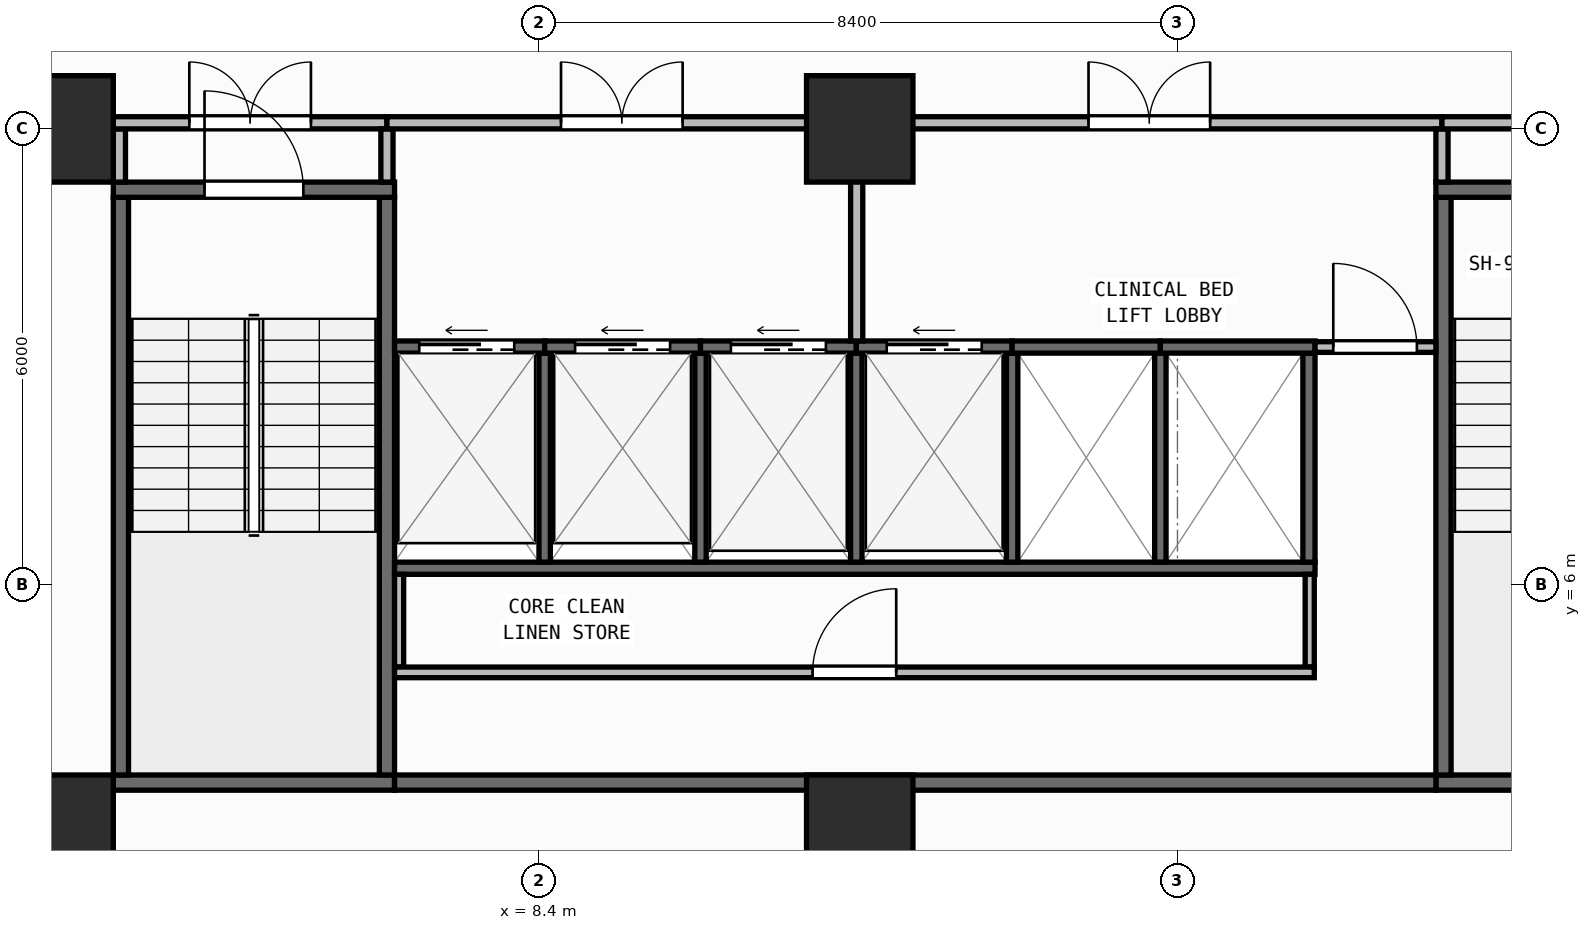
"""IFC4 building model, lengths in metres.
Left out: names, types, materials, properties, quantities, classifications, styles, units other than length and angle.
Written with IfcOpenShell. Run it as: python <this file> out.ifc"""

import sys

from ifc_helpers import new_model, si_unit, direction, frame, frame_2d, origin, origin_2d, place, context, subcontext, project, spatial, rectangle, extrude, element, fill, save


model = new_model("IFC4")
c1 = context("Model", 3, precision=1e-05, world=origin(), true_north=direction((0.0, 1.0)))
c2 = subcontext(c1, "Body", "Model", "MODEL_VIEW")
j1 = project(units=[si_unit("LENGTHUNIT", "METRE"), si_unit("PLANEANGLEUNIT", "RADIAN")], contexts=[c1])
p1 = place(None, origin())
s1 = spatial("IfcSite", under=j1, at=p1, CompositionType="ELEMENT")
p2 = place(p1, origin())
s2 = spatial("IfcBuilding", under=s1, at=p2, CompositionType="ELEMENT")
p3 = place(p2, frame((0.0, 0.0, 89.65)))
s3 = spatial("IfcBuildingStorey", under=s2, at=p3, CompositionType="ELEMENT", Elevation=89.65)
for number, where, z_axis, x_axis in (
    (1, (2.1, 2.8, 0.0), (0.0, 0.0, 1.0), (1.0, 0.0, 0.0)),
    (2, (12.62, 2.8, 0.0), (0.0, 0.0, 1.0), (1.0, 0.0, 0.0)),
    (3, (2.1, 12.0, 0.0), (0.0, 0.0, 1.0), (1.0, 0.0, 0.0)),
    (4, (12.62, 12.0, 0.0), (0.0, 0.0, 1.0), (1.0, 0.0, 0.0)),
):
    element("IfcColumn", number, at=place(p3, frame(where, z_axis=z_axis, x_axis=x_axis)), inside=s3, PredefinedType="COLUMN", context=c2, shape_type="SweptSolid", body=[
        extrude(rectangle(XDim=1.4, YDim=1.4, at=origin_2d()), origin(), (0.0, 0.0, 1.0), 3.95),
    ])
p4 = place(p3, frame((2.76, 0.174, 0.0), z_axis=(0.0, 0.0, 1.0), x_axis=(0.996571478456, 0.082736257641, 0.0)))
e5 = element("IfcWall", 5, at=p4, inside=s3, PredefinedType="STANDARD", context=c2, shape_type="SweptSolid", body=[
    extrude(rectangle(XDim=52.861, YDim=0.26, at=frame_2d((26.431, 0.0))), origin(), (0.0, 0.0, 1.0), 3.71),
])
p5 = place(p4, frame((25.231, 0.0, 0.9)))
e6 = element("IfcOpeningElement", 6, at=p5, cuts=e5, PredefinedType="OPENING", context=c2, shape_type="SweptSolid", body=[
    extrude(rectangle(XDim=2.4, YDim=1.65, at=frame_2d((1.2, 0.825))), frame((0.0, 0.14, 0.0), z_axis=(0.0, -1.0, 0.0), x_axis=(1.0, 0.0, 0.0)), (0.0, 0.0, 1.0), 0.28),
])
p6 = place(p3, frame((2.8, 3.4, 0.0), z_axis=(0.0, 0.0, 1.0), x_axis=(1.0, 0.0, 0.0)))
e7 = element("IfcWall", 7, at=p6, inside=s3, PredefinedType="SHEAR", context=c2, shape_type="SweptSolid", body=[
    extrude(rectangle(XDim=3.7, YDim=0.2, at=frame_2d((1.85, 0.0))), origin(), (0.0, 0.0, 1.0), 3.71),
])
for number, where, z_axis, x_axis in (
    (8, (2.9, 3.5, 0.0), (0.0, 0.0, 1.0), (0.0, 1.0, 0.0)),
    (9, (6.4, 3.5, 0.0), (0.0, 0.0, 1.0), (0.0, 1.0, 0.0)),
):
    element("IfcWall", number, at=place(p3, frame(where, z_axis=z_axis, x_axis=x_axis)), inside=s3, PredefinedType="SHEAR", context=c2, shape_type="SweptSolid", body=[
        extrude(rectangle(XDim=7.6, YDim=0.2, at=frame_2d((3.8, 0.0))), origin(), (0.0, 0.0, 1.0), 3.71),
    ])
p7 = place(p3, frame((2.8, 11.2, 0.0), z_axis=(0.0, 0.0, 1.0), x_axis=(1.0, 0.0, 0.0)))
e10 = element("IfcWall", 10, at=p7, inside=s3, PredefinedType="SHEAR", context=c2, shape_type="SweptSolid", body=[
    extrude(rectangle(XDim=3.7, YDim=0.2, at=frame_2d((1.85, 0.0))), origin(), (0.0, 0.0, 1.0), 3.71),
])
p8 = place(p7, frame((1.2, 0.0, 0.0)))
e11 = element("IfcOpeningElement", 11, at=p8, cuts=e10, PredefinedType="OPENING", context=c2, shape_type="SweptSolid", body=[
    extrude(rectangle(XDim=1.3, YDim=2.15, at=frame_2d((0.65, 1.075))), frame((0.0, 0.11, 0.0), z_axis=(0.0, -1.0, 0.0), x_axis=(1.0, 0.0, 0.0)), (0.0, 0.0, 1.0), 0.22),
])
p9 = place(p3, frame((20.2, 3.4, 0.0), z_axis=(0.0, 0.0, 1.0), x_axis=(1.0, 0.0, 0.0)))
e12 = element("IfcWall", 12, at=p9, inside=s3, PredefinedType="SHEAR", context=c2, shape_type="SweptSolid", body=[
    extrude(rectangle(XDim=3.7, YDim=0.2, at=frame_2d((1.85, 0.0))), origin(), (0.0, 0.0, 1.0), 3.71),
])
p10 = place(p3, frame((20.3, 3.5, 0.0), z_axis=(0.0, 0.0, 1.0), x_axis=(0.0, 1.0, 0.0)))
e13 = element("IfcWall", 13, at=p10, inside=s3, PredefinedType="SHEAR", context=c2, shape_type="SweptSolid", body=[
    extrude(rectangle(XDim=7.6, YDim=0.2, at=frame_2d((3.8, 0.0))), origin(), (0.0, 0.0, 1.0), 3.71),
])
p11 = place(p3, frame((20.2, 11.2, 0.0), z_axis=(0.0, 0.0, 1.0), x_axis=(1.0, 0.0, 0.0)))
e14 = element("IfcWall", 14, at=p11, inside=s3, PredefinedType="SHEAR", context=c2, shape_type="SweptSolid", body=[
    extrude(rectangle(XDim=3.7, YDim=0.2, at=frame_2d((1.85, 0.0))), origin(), (0.0, 0.0, 1.0), 3.71),
])
p12 = place(p11, frame((1.2, 0.0, 0.0)))
e15 = element("IfcOpeningElement", 15, at=p12, cuts=e14, PredefinedType="OPENING", context=c2, shape_type="SweptSolid", body=[
    extrude(rectangle(XDim=1.3, YDim=2.15, at=frame_2d((0.65, 1.075))), frame((0.0, 0.11, 0.0), z_axis=(0.0, -1.0, 0.0), x_axis=(1.0, 0.0, 0.0)), (0.0, 0.0, 1.0), 0.22),
])
p13 = place(p3, frame((6.5, 3.4, 0.0), z_axis=(0.0, 0.0, 1.0), x_axis=(1.0, 0.0, 0.0)))
e16 = element("IfcWall", 16, at=p13, inside=s3, PredefinedType="SHEAR", context=c2, shape_type="SweptSolid", body=[
    extrude(rectangle(XDim=13.7, YDim=0.2, at=frame_2d((6.85, 0.0))), origin(), (0.0, 0.0, 1.0), 3.71),
])
p14 = place(p3, frame((6.5, 6.22, 0.0), z_axis=(0.0, 0.0, 1.0), x_axis=(1.0, 0.0, 0.0)))
e17 = element("IfcWall", 17, at=p14, inside=s3, PredefinedType="SHEAR", context=c2, shape_type="SweptSolid", body=[
    extrude(rectangle(XDim=12.11, YDim=0.16, at=frame_2d((6.055, 0.0))), origin(), (0.0, 0.0, 1.0), 3.71),
])
p15 = place(p3, frame((18.53, 6.3, 0.0), z_axis=(0.0, 0.0, 1.0), x_axis=(0.0, 1.0, 0.0)))
e18 = element("IfcWall", 18, at=p15, inside=s3, PredefinedType="SHEAR", context=c2, shape_type="SweptSolid", body=[
    extrude(rectangle(XDim=2.75, YDim=0.16, at=frame_2d((1.375, 0.0))), origin(), (0.0, 0.0, 1.0), 3.71),
])
for number, where, z_axis, x_axis in (
    (19, (8.475, 6.3, 0.0), (0.0, 0.0, 1.0), (0.0, 1.0, 0.0)),
    (20, (10.525, 6.3, 0.0), (0.0, 0.0, 1.0), (0.0, 1.0, 0.0)),
    (21, (12.575, 6.3, 0.0), (0.0, 0.0, 1.0), (0.0, 1.0, 0.0)),
    (22, (14.625, 6.3, 0.0), (0.0, 0.0, 1.0), (0.0, 1.0, 0.0)),
    (23, (16.575, 6.3, 0.0), (0.0, 0.0, 1.0), (0.0, 1.0, 0.0)),
):
    element("IfcWall", number, at=place(p3, frame(where, z_axis=z_axis, x_axis=x_axis)), inside=s3, PredefinedType="SHEAR", context=c2, shape_type="SweptSolid", body=[
        extrude(rectangle(XDim=2.75, YDim=0.15, at=frame_2d((1.375, 0.0))), origin(), (0.0, 0.0, 1.0), 3.71),
    ])
p16 = place(p3, frame((6.5, 9.13, 0.0), z_axis=(0.0, 0.0, 1.0), x_axis=(1.0, 0.0, 0.0)))
e24 = element("IfcWall", 24, at=p16, inside=s3, PredefinedType="SHEAR", context=c2, shape_type="SweptSolid", body=[
    extrude(rectangle(XDim=1.975, YDim=0.16, at=frame_2d((0.988, 0.0))), origin(), (0.0, 0.0, 1.0), 3.71),
])
p17 = place(p16, frame((0.325, 0.0, 0.0)))
e25 = element("IfcOpeningElement", 25, at=p17, cuts=e24, PredefinedType="OPENING", context=c2, shape_type="SweptSolid", body=[
    extrude(rectangle(XDim=1.25, YDim=2.15, at=frame_2d((0.625, 1.075))), frame((0.0, 0.09, 0.0), z_axis=(0.0, -1.0, 0.0), x_axis=(1.0, 0.0, 0.0)), (0.0, 0.0, 1.0), 0.18),
])
p18 = place(p3, frame((8.475, 9.13, 0.0), z_axis=(0.0, 0.0, 1.0), x_axis=(1.0, 0.0, 0.0)))
e26 = element("IfcWall", 26, at=p18, inside=s3, PredefinedType="SHEAR", context=c2, shape_type="SweptSolid", body=[
    extrude(rectangle(XDim=2.05, YDim=0.16, at=frame_2d((1.025, 0.0))), origin(), (0.0, 0.0, 1.0), 3.71),
])
p19 = place(p18, frame((0.4, 0.0, 0.0)))
e27 = element("IfcOpeningElement", 27, at=p19, cuts=e26, PredefinedType="OPENING", context=c2, shape_type="SweptSolid", body=[
    extrude(rectangle(XDim=1.25, YDim=2.15, at=frame_2d((0.625, 1.075))), frame((0.0, 0.09, 0.0), z_axis=(0.0, -1.0, 0.0), x_axis=(1.0, 0.0, 0.0)), (0.0, 0.0, 1.0), 0.18),
])
p20 = place(p3, frame((10.525, 9.13, 0.0), z_axis=(0.0, 0.0, 1.0), x_axis=(1.0, 0.0, 0.0)))
e28 = element("IfcWall", 28, at=p20, inside=s3, PredefinedType="SHEAR", context=c2, shape_type="SweptSolid", body=[
    extrude(rectangle(XDim=2.05, YDim=0.16, at=frame_2d((1.025, 0.0))), origin(), (0.0, 0.0, 1.0), 3.71),
])
p21 = place(p20, frame((0.4, 0.0, 0.0)))
e29 = element("IfcOpeningElement", 29, at=p21, cuts=e28, PredefinedType="OPENING", context=c2, shape_type="SweptSolid", body=[
    extrude(rectangle(XDim=1.25, YDim=2.15, at=frame_2d((0.625, 1.075))), frame((0.0, 0.09, 0.0), z_axis=(0.0, -1.0, 0.0), x_axis=(1.0, 0.0, 0.0)), (0.0, 0.0, 1.0), 0.18),
])
p22 = place(p3, frame((12.575, 9.13, 0.0), z_axis=(0.0, 0.0, 1.0), x_axis=(1.0, 0.0, 0.0)))
e30 = element("IfcWall", 30, at=p22, inside=s3, PredefinedType="SHEAR", context=c2, shape_type="SweptSolid", body=[
    extrude(rectangle(XDim=2.05, YDim=0.16, at=frame_2d((1.025, 0.0))), origin(), (0.0, 0.0, 1.0), 3.71),
])
p23 = place(p22, frame((0.4, 0.0, 0.0)))
e31 = element("IfcOpeningElement", 31, at=p23, cuts=e30, PredefinedType="OPENING", context=c2, shape_type="SweptSolid", body=[
    extrude(rectangle(XDim=1.25, YDim=2.15, at=frame_2d((0.625, 1.075))), frame((0.0, 0.09, 0.0), z_axis=(0.0, -1.0, 0.0), x_axis=(1.0, 0.0, 0.0)), (0.0, 0.0, 1.0), 0.18),
])
p24 = place(p3, frame((14.625, 9.13, 0.0), z_axis=(0.0, 0.0, 1.0), x_axis=(1.0, 0.0, 0.0)))
e32 = element("IfcWall", 32, at=p24, inside=s3, PredefinedType="SHEAR", context=c2, shape_type="SweptSolid", body=[
    extrude(rectangle(XDim=1.95, YDim=0.16, at=frame_2d((0.975, 0.0))), origin(), (0.0, 0.0, 1.0), 3.71),
])
p25 = place(p3, frame((16.575, 9.13, 0.0), z_axis=(0.0, 0.0, 1.0), x_axis=(1.0, 0.0, 0.0)))
e33 = element("IfcWall", 33, at=p25, inside=s3, PredefinedType="SHEAR", context=c2, shape_type="SweptSolid", body=[
    extrude(rectangle(XDim=2.035, YDim=0.16, at=frame_2d((1.018, 0.0))), origin(), (0.0, 0.0, 1.0), 3.71),
])
for number, where, z_axis, x_axis in (
    (34, (6.56, 4.92, 0.0), (0.0, 0.0, 1.0), (0.0, 1.0, 0.0)),
    (35, (18.54, 4.92, 0.0), (0.0, 0.0, 1.0), (0.0, 1.0, 0.0)),
):
    element("IfcWall", number, at=place(p3, frame(where, z_axis=z_axis, x_axis=x_axis)), inside=s3, PredefinedType="PARTITIONING", context=c2, shape_type="SweptSolid", body=[
        extrude(rectangle(XDim=1.22, YDim=0.12, at=frame_2d((0.61, 0.0))), origin(), (0.0, 0.0, 1.0), 3.71),
    ])
p26 = place(p3, frame((6.5, 4.85, 0.0), z_axis=(0.0, 0.0, 1.0), x_axis=(1.0, 0.0, 0.0)))
e36 = element("IfcWall", 36, at=p26, inside=s3, PredefinedType="PARTITIONING", context=c2, shape_type="SweptSolid", body=[
    extrude(rectangle(XDim=12.1, YDim=0.14, at=frame_2d((6.05, 0.0))), origin(), (0.0, 0.0, 1.0), 3.71),
])
p27 = place(p26, frame((5.5, 0.0, 0.0)))
e37 = element("IfcOpeningElement", 37, at=p27, cuts=e36, PredefinedType="OPENING", context=c2, shape_type="SweptSolid", body=[
    extrude(rectangle(XDim=1.1, YDim=2.1, at=frame_2d((0.55, 1.05))), frame((0.0, 0.08, 0.0), z_axis=(0.0, -1.0, 0.0), x_axis=(1.0, 0.0, 0.0)), (0.0, 0.0, 1.0), 0.16),
])
p28 = place(p3, frame((18.61, 9.13, 0.0), z_axis=(0.0, 0.0, 1.0), x_axis=(1.0, 0.0, 0.0)))
e38 = element("IfcWall", 38, at=p28, inside=s3, PredefinedType="PARTITIONING", context=c2, shape_type="SweptSolid", body=[
    extrude(rectangle(XDim=1.59, YDim=0.14, at=frame_2d((0.795, 0.0))), origin(), (0.0, 0.0, 1.0), 3.71),
])
p29 = place(p28, frame((0.24, 0.0, 0.0)))
e39 = element("IfcOpeningElement", 39, at=p29, cuts=e38, PredefinedType="OPENING", context=c2, shape_type="SweptSolid", body=[
    extrude(rectangle(XDim=1.1, YDim=2.1, at=frame_2d((0.55, 1.05))), frame((0.0, 0.08, 0.0), z_axis=(0.0, -1.0, 0.0), x_axis=(1.0, 0.0, 0.0)), (0.0, 0.0, 1.0), 0.16),
])
p30 = place(p3, frame((2.88, 11.3, 0.0), z_axis=(0.0, 0.0, 1.0), x_axis=(0.0, 1.0, 0.0)))
e40 = element("IfcWall", 40, at=p30, inside=s3, PredefinedType="PARTITIONING", context=c2, shape_type="SweptSolid", body=[
    extrude(rectangle(XDim=0.7, YDim=0.16, at=frame_2d((0.35, 0.0))), origin(), (0.0, 0.0, 1.0), 3.71),
])
p31 = place(p3, frame((2.8, 12.08, 0.0), z_axis=(0.0, 0.0, 1.0), x_axis=(1.0, 0.0, 0.0)))
e41 = element("IfcWall", 41, at=p31, inside=s3, PredefinedType="PARTITIONING", context=c2, shape_type="SweptSolid", body=[
    extrude(rectangle(XDim=3.6, YDim=0.16, at=frame_2d((1.8, 0.0))), origin(), (0.0, 0.0, 1.0), 3.073),
])
p32 = place(p31, frame((1.0, 0.0, 0.0)))
e42 = element("IfcOpeningElement", 42, at=p32, cuts=e41, PredefinedType="OPENING", context=c2, shape_type="SweptSolid", body=[
    extrude(rectangle(XDim=1.6, YDim=2.05, at=frame_2d((0.8, 1.025))), frame((0.0, 0.09, 0.0), z_axis=(0.0, -1.0, 0.0), x_axis=(1.0, 0.0, 0.0)), (0.0, 0.0, 1.0), 0.18),
])
p33 = place(p3, frame((6.4, 11.3, 0.0), z_axis=(0.0, 0.0, 1.0), x_axis=(0.0, 1.0, 0.0)))
e43 = element("IfcWall", 43, at=p33, inside=s3, PredefinedType="PARTITIONING", context=c2, shape_type="SweptSolid", body=[
    extrude(rectangle(XDim=0.7, YDim=0.16, at=frame_2d((0.35, 0.0))), origin(), (0.0, 0.0, 1.0), 3.71),
])
p34 = place(p3, frame((6.4, 12.08, 0.0), z_axis=(0.0, 0.0, 1.0), x_axis=(1.0, 0.0, 0.0)))
e44 = element("IfcWall", 44, at=p34, inside=s3, PredefinedType="PARTITIONING", context=c2, shape_type="SweptSolid", body=[
    extrude(rectangle(XDim=6.18, YDim=0.16, at=frame_2d((3.09, 0.0))), origin(), (0.0, 0.0, 1.0), 3.073),
])
p35 = place(p34, frame((2.29, 0.0, 0.0)))
e45 = element("IfcOpeningElement", 45, at=p35, cuts=e44, PredefinedType="OPENING", context=c2, shape_type="SweptSolid", body=[
    extrude(rectangle(XDim=1.6, YDim=2.05, at=frame_2d((0.8, 1.025))), frame((0.0, 0.09, 0.0), z_axis=(0.0, -1.0, 0.0), x_axis=(1.0, 0.0, 0.0)), (0.0, 0.0, 1.0), 0.18),
])
p36 = place(p3, frame((12.58, 9.21, 0.0), z_axis=(0.0, 0.0, 1.0), x_axis=(0.0, 1.0, 0.0)))
e46 = element("IfcWall", 46, at=p36, inside=s3, PredefinedType="PARTITIONING", context=c2, shape_type="SweptSolid", body=[
    extrude(rectangle(XDim=2.79, YDim=0.16, at=frame_2d((1.395, 0.0))), origin(), (0.0, 0.0, 1.0), 3.71),
])
p37 = place(p3, frame((12.58, 12.08, 0.0), z_axis=(0.0, 0.0, 1.0), x_axis=(1.0, 0.0, 0.0)))
e47 = element("IfcWall", 47, at=p37, inside=s3, PredefinedType="PARTITIONING", context=c2, shape_type="SweptSolid", body=[
    extrude(rectangle(XDim=7.7, YDim=0.16, at=frame_2d((3.85, 0.0))), origin(), (0.0, 0.0, 1.0), 3.073),
])
p38 = place(p37, frame((3.05, 0.0, 0.0)))
e48 = element("IfcOpeningElement", 48, at=p38, cuts=e47, PredefinedType="OPENING", context=c2, shape_type="SweptSolid", body=[
    extrude(rectangle(XDim=1.6, YDim=2.05, at=frame_2d((0.8, 1.025))), frame((0.0, 0.09, 0.0), z_axis=(0.0, -1.0, 0.0), x_axis=(1.0, 0.0, 0.0)), (0.0, 0.0, 1.0), 0.18),
])
p39 = place(p3, frame((20.28, 11.3, 0.0), z_axis=(0.0, 0.0, 1.0), x_axis=(0.0, 1.0, 0.0)))
e49 = element("IfcWall", 49, at=p39, inside=s3, PredefinedType="PARTITIONING", context=c2, shape_type="SweptSolid", body=[
    extrude(rectangle(XDim=0.7, YDim=0.16, at=frame_2d((0.35, 0.0))), origin(), (0.0, 0.0, 1.0), 3.71),
])
p40 = place(p3, frame((20.28, 12.08, 0.0), z_axis=(0.0, 0.0, 1.0), x_axis=(1.0, 0.0, 0.0)))
e50 = element("IfcWall", 50, at=p40, inside=s3, PredefinedType="PARTITIONING", context=c2, shape_type="SweptSolid", body=[
    extrude(rectangle(XDim=3.62, YDim=0.16, at=frame_2d((1.81, 0.0))), origin(), (0.0, 0.0, 1.0), 3.073),
])
p41 = place(p40, frame((1.01, 0.0, 0.0)))
e51 = element("IfcOpeningElement", 51, at=p41, cuts=e50, PredefinedType="OPENING", context=c2, shape_type="SweptSolid", body=[
    extrude(rectangle(XDim=1.6, YDim=2.05, at=frame_2d((0.8, 1.025))), frame((0.0, 0.09, 0.0), z_axis=(0.0, -1.0, 0.0), x_axis=(1.0, 0.0, 0.0)), (0.0, 0.0, 1.0), 0.18),
])
p42 = place(p8, origin())
e52 = element("IfcDoor", 52, at=p42, inside=s3, OperationType="SINGLE_SWING_LEFT", PredefinedType="DOOR", context=c2, shape_type="SweptSolid", body=[
    extrude(rectangle(XDim=1.3, YDim=2.15, at=frame_2d((0.65, 1.075))), frame((0.0, 0.025, 0.0), z_axis=(0.0, -1.0, 0.0), x_axis=(1.0, 0.0, 0.0)), (0.0, 0.0, 1.0), 0.05),
])
fill(e11, e52)
p43 = place(p17, origin())
e53 = element("IfcDoor", 53, at=p43, inside=s3, OperationType="SLIDING_TO_LEFT", PredefinedType="DOOR", context=c2, shape_type="SweptSolid", body=[
    extrude(rectangle(XDim=1.25, YDim=2.15, at=frame_2d((0.625, 1.075))), frame((0.0, 0.025, 0.0), z_axis=(0.0, -1.0, 0.0), x_axis=(1.0, 0.0, 0.0)), (0.0, 0.0, 1.0), 0.05),
])
fill(e25, e53)
p44 = place(p19, origin())
e54 = element("IfcDoor", 54, at=p44, inside=s3, OperationType="SLIDING_TO_LEFT", PredefinedType="DOOR", context=c2, shape_type="SweptSolid", body=[
    extrude(rectangle(XDim=1.25, YDim=2.15, at=frame_2d((0.625, 1.075))), frame((0.0, 0.025, 0.0), z_axis=(0.0, -1.0, 0.0), x_axis=(1.0, 0.0, 0.0)), (0.0, 0.0, 1.0), 0.05),
])
fill(e27, e54)
p45 = place(p21, origin())
e55 = element("IfcDoor", 55, at=p45, inside=s3, OperationType="SLIDING_TO_LEFT", PredefinedType="DOOR", context=c2, shape_type="SweptSolid", body=[
    extrude(rectangle(XDim=1.25, YDim=2.15, at=frame_2d((0.625, 1.075))), frame((0.0, 0.025, 0.0), z_axis=(0.0, -1.0, 0.0), x_axis=(1.0, 0.0, 0.0)), (0.0, 0.0, 1.0), 0.05),
])
fill(e29, e55)
p46 = place(p23, origin())
e56 = element("IfcDoor", 56, at=p46, inside=s3, OperationType="SLIDING_TO_LEFT", PredefinedType="DOOR", context=c2, shape_type="SweptSolid", body=[
    extrude(rectangle(XDim=1.25, YDim=2.15, at=frame_2d((0.625, 1.075))), frame((0.0, 0.025, 0.0), z_axis=(0.0, -1.0, 0.0), x_axis=(1.0, 0.0, 0.0)), (0.0, 0.0, 1.0), 0.05),
])
fill(e31, e56)
p47 = place(p27, origin())
e57 = element("IfcDoor", 57, at=p47, inside=s3, OperationType="SINGLE_SWING_RIGHT", PredefinedType="DOOR", context=c2, shape_type="SweptSolid", body=[
    extrude(rectangle(XDim=1.1, YDim=2.1, at=frame_2d((0.55, 1.05))), frame((0.0, 0.025, 0.0), z_axis=(0.0, -1.0, 0.0), x_axis=(1.0, 0.0, 0.0)), (0.0, 0.0, 1.0), 0.05),
])
fill(e37, e57)
p48 = place(p29, origin())
e58 = element("IfcDoor", 58, at=p48, inside=s3, OperationType="SINGLE_SWING_LEFT", PredefinedType="DOOR", context=c2, shape_type="SweptSolid", body=[
    extrude(rectangle(XDim=1.1, YDim=2.1, at=frame_2d((0.55, 1.05))), frame((0.0, 0.025, 0.0), z_axis=(0.0, -1.0, 0.0), x_axis=(1.0, 0.0, 0.0)), (0.0, 0.0, 1.0), 0.05),
])
fill(e39, e58)
p49 = place(p32, origin())
e59 = element("IfcDoor", 59, at=p49, inside=s3, OperationType="DOUBLE_DOOR_SINGLE_SWING", PredefinedType="DOOR", context=c2, shape_type="SweptSolid", body=[
    extrude(rectangle(XDim=1.6, YDim=2.05, at=frame_2d((0.8, 1.025))), frame((0.0, 0.025, 0.0), z_axis=(0.0, -1.0, 0.0), x_axis=(1.0, 0.0, 0.0)), (0.0, 0.0, 1.0), 0.05),
])
fill(e42, e59)
p50 = place(p35, origin())
e60 = element("IfcDoor", 60, at=p50, inside=s3, OperationType="DOUBLE_DOOR_SINGLE_SWING", PredefinedType="DOOR", context=c2, shape_type="SweptSolid", body=[
    extrude(rectangle(XDim=1.6, YDim=2.05, at=frame_2d((0.8, 1.025))), frame((0.0, 0.025, 0.0), z_axis=(0.0, -1.0, 0.0), x_axis=(1.0, 0.0, 0.0)), (0.0, 0.0, 1.0), 0.05),
])
fill(e45, e60)
p51 = place(p38, origin())
e61 = element("IfcDoor", 61, at=p51, inside=s3, OperationType="DOUBLE_DOOR_SINGLE_SWING", PredefinedType="DOOR", context=c2, shape_type="SweptSolid", body=[
    extrude(rectangle(XDim=1.6, YDim=2.05, at=frame_2d((0.8, 1.025))), frame((0.0, 0.025, 0.0), z_axis=(0.0, -1.0, 0.0), x_axis=(1.0, 0.0, 0.0)), (0.0, 0.0, 1.0), 0.05),
])
fill(e48, e61)
save(model, sys.argv[1])
